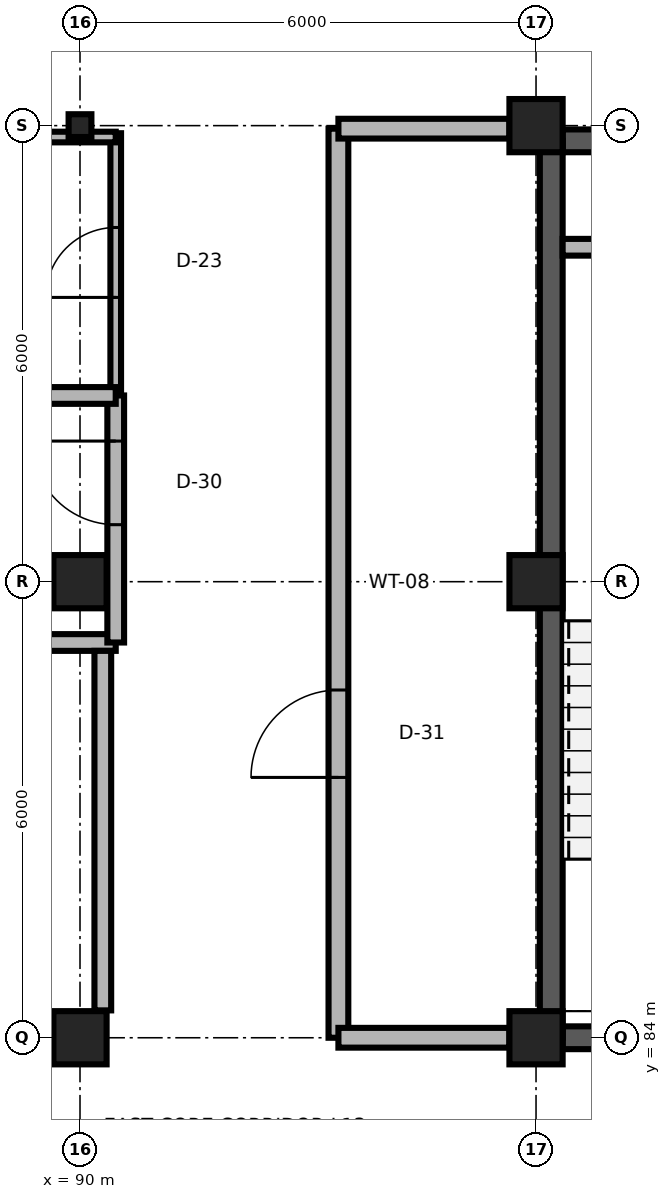
"""IFC4 building model, lengths in metres.
Left out: names, types, materials, properties, quantities, classifications, styles, units other than length and angle.
Written with IfcOpenShell. Run it as: python <this file> out.ifc"""

import sys

from ifc_helpers import new_model, si_unit, direction, frame, frame_2d, origin, origin_2d, place, context, subcontext, project, spatial, rectangle, i_section, extrude, element, fill, save


model = new_model("IFC4")
c1 = context("Model", 3, precision=1e-05, world=origin(), true_north=direction((0.0, 1.0)))
c2 = subcontext(c1, "Body", "Model", "MODEL_VIEW")
j1 = project(units=[si_unit("LENGTHUNIT", "METRE"), si_unit("PLANEANGLEUNIT", "RADIAN")], contexts=[c1])
p1 = place(None, origin())
s1 = spatial("IfcSite", under=j1, at=p1, CompositionType="ELEMENT")
p2 = place(p1, origin())
s2 = spatial("IfcBuilding", under=s1, at=p2, CompositionType="ELEMENT")
p3 = place(p2, frame((0.0, 0.0, 52.2)))
s3 = spatial("IfcBuildingStorey", under=s2, at=p3, CompositionType="ELEMENT", Elevation=52.2)
for number, where, z_axis, x_axis in (
    (1, (90.0, 84.0, 0.0), (0.0, 0.0, 1.0), (1.0, 0.0, 0.0)),
    (2, (96.0, 84.0, 0.0), (0.0, 0.0, 1.0), (1.0, 0.0, 0.0)),
    (3, (90.0, 90.0, 0.0), (0.0, 0.0, 1.0), (1.0, 0.0, 0.0)),
    (4, (96.0, 90.0, 0.0), (0.0, 0.0, 1.0), (1.0, 0.0, 0.0)),
):
    element("IfcColumn", number, at=place(p3, frame(where, z_axis=z_axis, x_axis=x_axis)), inside=s3, PredefinedType="COLUMN", context=c2, shape_type="SweptSolid", body=[
        extrude(rectangle(XDim=0.7, YDim=0.7, at=origin_2d()), origin(), (0.0, 0.0, 1.0), 3.9),
    ])
p4 = place(p3, frame((90.0, 96.0, 0.0), z_axis=(0.0, 0.0, 1.0), x_axis=(1.0, 0.0, 0.0)))
e5 = element("IfcColumn", 5, at=p4, inside=s3, PredefinedType="COLUMN", context=c2, shape_type="SweptSolid", body=[
    extrude(i_section(OverallWidth=0.3, OverallDepth=0.3, WebThickness=0.01, FlangeThickness=0.015, FilletRadius=0.018, at=origin_2d()), origin(), (0.0, 0.0, 1.0), 3.9),
])
p5 = place(p3, frame((96.0, 96.0, 0.0), z_axis=(0.0, 0.0, 1.0), x_axis=(1.0, 0.0, 0.0)))
e6 = element("IfcColumn", 6, at=p5, inside=s3, PredefinedType="COLUMN", context=c2, shape_type="SweptSolid", body=[
    extrude(rectangle(XDim=0.7, YDim=0.7, at=origin_2d()), origin(), (0.0, 0.0, 1.0), 3.9),
])
p6 = place(p3, frame((96.35, 84.0, 0.0), z_axis=(0.0, 0.0, 1.0), x_axis=(1.0, 0.0, 0.0)))
e7 = element("IfcWall", 7, at=p6, inside=s3, PredefinedType="SHEAR", context=c2, shape_type="SweptSolid", body=[
    extrude(rectangle(XDim=5.3, YDim=0.3, at=frame_2d((2.65, 0.0))), origin(), (0.0, 0.0, 1.0), 3.66),
])
p7 = place(p6, frame((1.975, 0.0, 0.0)))
e8 = element("IfcOpeningElement", 8, at=p7, cuts=e7, PredefinedType="OPENING", context=c2, shape_type="SweptSolid", body=[
    extrude(rectangle(XDim=1.35, YDim=2.2, at=frame_2d((0.675, 1.1))), frame((0.0, 0.165, 0.0), z_axis=(0.0, -1.0, 0.0), x_axis=(1.0, 0.0, 0.0)), (0.0, 0.0, 1.0), 0.33),
])
p8 = place(p3, frame((96.35, 95.8, 0.0), z_axis=(0.0, 0.0, 1.0), x_axis=(1.0, 0.0, 0.0)))
e9 = element("IfcWall", 9, at=p8, inside=s3, PredefinedType="SHEAR", context=c2, shape_type="SweptSolid", body=[
    extrude(rectangle(XDim=5.3, YDim=0.3, at=frame_2d((2.65, 0.0))), origin(), (0.0, 0.0, 1.0), 3.74),
])
p9 = place(p3, frame((96.2, 84.0, 0.0), z_axis=(0.0, 0.0, 1.0), x_axis=(0.0, 1.0, 0.0)))
e10 = element("IfcWall", 10, at=p9, inside=s3, PredefinedType="SHEAR", context=c2, shape_type="SweptSolid", body=[
    extrude(rectangle(XDim=11.8, YDim=0.3, at=frame_2d((5.9, 0.0))), origin(), (0.0, 0.0, 1.0), 3.74),
])
p10 = place(p3, frame((96.35, 94.4, 0.0), z_axis=(0.0, 0.0, 1.0), x_axis=(1.0, 0.0, 0.0)))
e11 = element("IfcWall", 11, at=p10, inside=s3, PredefinedType="PARTITIONING", context=c2, shape_type="SweptSolid", body=[
    extrude(rectangle(XDim=1.1, YDim=0.22, at=frame_2d((0.55, 0.0))), origin(), (0.0, 0.0, 1.0), 3.74),
])
p11 = place(p3, frame((93.4, 84.0, 0.0), z_axis=(0.0, 0.0, 1.0), x_axis=(0.0, 1.0, 0.0)))
e12 = element("IfcWall", 12, at=p11, inside=s3, PredefinedType="PARTITIONING", context=c2, shape_type="SweptSolid", body=[
    extrude(rectangle(XDim=11.96, YDim=0.26, at=frame_2d((5.98, 0.0))), origin(), (0.0, 0.0, 1.0), 3.74),
])
p12 = place(p11, frame((3.425, 0.0, 0.0)))
e13 = element("IfcOpeningElement", 13, at=p12, cuts=e12, PredefinedType="OPENING", context=c2, shape_type="SweptSolid", body=[
    extrude(rectangle(XDim=1.15, YDim=2.2, at=frame_2d((0.575, 1.1))), frame((0.0, 0.145, 0.0), z_axis=(0.0, -1.0, 0.0), x_axis=(1.0, 0.0, 0.0)), (0.0, 0.0, 1.0), 0.29),
])
for number, where, z_axis, x_axis in (
    (14, (93.4, 84.0, 0.0), (0.0, 0.0, 1.0), (1.0, 0.0, 0.0)),
    (15, (93.4, 95.96, 0.0), (0.0, 0.0, 1.0), (1.0, 0.0, 0.0)),
):
    element("IfcWall", number, at=place(p3, frame(where, z_axis=z_axis, x_axis=x_axis)), inside=s3, PredefinedType="PARTITIONING", context=c2, shape_type="SweptSolid", body=[
        extrude(rectangle(XDim=2.25, YDim=0.26, at=frame_2d((1.125, 0.0))), origin(), (0.0, 0.0, 1.0), 3.449),
    ])
p13 = place(p3, frame((87.8, 84.0, 0.0), z_axis=(0.0, 0.0, 1.0), x_axis=(1.0, 0.0, 0.0)))
e16 = element("IfcWall", 16, at=p13, inside=s3, PredefinedType="PARTITIONING", context=c2, shape_type="SweptSolid", body=[
    extrude(rectangle(XDim=2.5, YDim=0.22, at=frame_2d((1.25, 0.0))), origin(), (0.0, 0.0, 1.0), 3.449),
])
p14 = place(p13, frame((0.75, 0.0, 0.0)))
e17 = element("IfcOpeningElement", 17, at=p14, cuts=e16, PredefinedType="OPENING", context=c2, shape_type="SweptSolid", body=[
    extrude(rectangle(XDim=1.0, YDim=2.15, at=frame_2d((0.5, 1.075))), frame((0.0, 0.125, 0.0), z_axis=(0.0, -1.0, 0.0), x_axis=(1.0, 0.0, 0.0)), (0.0, 0.0, 1.0), 0.25),
])
p15 = place(p3, frame((80.6, 89.2, 0.0), z_axis=(0.0, 0.0, 1.0), x_axis=(1.0, 0.0, 0.0)))
e18 = element("IfcWall", 18, at=p15, inside=s3, PredefinedType="PARTITIONING", context=c2, shape_type="SweptSolid", body=[
    extrude(rectangle(XDim=9.87, YDim=0.22, at=frame_2d((4.935, 0.0))), origin(), (0.0, 0.0, 1.0), 3.74),
])
p16 = place(p3, frame((90.47, 89.2, 0.0), z_axis=(0.0, 0.0, 1.0), x_axis=(0.0, 1.0, 0.0)))
e19 = element("IfcWall", 19, at=p16, inside=s3, PredefinedType="PARTITIONING", context=c2, shape_type="SweptSolid", body=[
    extrude(rectangle(XDim=3.25, YDim=0.22, at=frame_2d((1.625, 0.0))), origin(), (0.0, 0.0, 1.0), 3.74),
])
p17 = place(p16, frame((1.55, 0.0, 0.0)))
e20 = element("IfcOpeningElement", 20, at=p17, cuts=e19, PredefinedType="OPENING", context=c2, shape_type="SweptSolid", body=[
    extrude(rectangle(XDim=1.1, YDim=2.15, at=frame_2d((0.55, 1.075))), frame((0.0, 0.125, 0.0), z_axis=(0.0, -1.0, 0.0), x_axis=(1.0, 0.0, 0.0)), (0.0, 0.0, 1.0), 0.25),
])
p18 = place(p3, frame((90.47, 92.5, 0.0), z_axis=(0.0, 0.0, 1.0), x_axis=(0.0, 1.0, 0.0)))
e21 = element("IfcWall", 21, at=p18, inside=s3, PredefinedType="PARTITIONING", context=c2, shape_type="SweptSolid", body=[
    extrude(rectangle(XDim=3.4, YDim=0.14, at=frame_2d((1.7, 0.0))), origin(), (0.0, 0.0, 1.0), 3.74),
])
p19 = place(p18, frame((1.24, 0.0, 0.0)))
e22 = element("IfcOpeningElement", 22, at=p19, cuts=e21, PredefinedType="OPENING", context=c2, shape_type="SweptSolid", body=[
    extrude(rectangle(XDim=0.92, YDim=2.15, at=frame_2d((0.46, 1.075))), frame((0.0, 0.085, 0.0), z_axis=(0.0, -1.0, 0.0), x_axis=(1.0, 0.0, 0.0)), (0.0, 0.0, 1.0), 0.17),
])
p20 = place(p3, frame((83.6, 95.85, 0.0), z_axis=(0.0, 0.0, 1.0), x_axis=(1.0, 0.0, 0.0)))
e23 = element("IfcWall", 23, at=p20, inside=s3, PredefinedType="PARTITIONING", context=c2, shape_type="SweptSolid", body=[
    extrude(rectangle(XDim=6.87, YDim=0.14, at=frame_2d((3.435, 0.0))), origin(), (0.0, 0.0, 1.0), 3.74),
])
p21 = place(p3, frame((90.3, 84.36, 0.0), z_axis=(0.0, 0.0, 1.0), x_axis=(0.0, 1.0, 0.0)))
e24 = element("IfcWall", 24, at=p21, inside=s3, PredefinedType="PARTITIONING", context=c2, shape_type="SweptSolid", body=[
    extrude(rectangle(XDim=4.73, YDim=0.22, at=frame_2d((2.365, 0.0))), origin(), (0.0, 0.0, 1.0), 3.74),
])
p22 = place(p3, frame((83.5, 92.45, 0.0), z_axis=(0.0, 0.0, 1.0), x_axis=(1.0, 0.0, 0.0)))
e25 = element("IfcWall", 25, at=p22, inside=s3, PredefinedType="PARTITIONING", context=c2, shape_type="SweptSolid", body=[
    extrude(rectangle(XDim=6.97, YDim=0.22, at=frame_2d((3.485, 0.0))), origin(), (0.0, 0.0, 1.0), 3.74),
])
p23 = place(p12, origin())
e26 = element("IfcDoor", 26, at=p23, inside=s3, OperationType="SINGLE_SWING_LEFT", PredefinedType="DOOR", context=c2, shape_type="SweptSolid", body=[
    extrude(rectangle(XDim=1.15, YDim=2.2, at=frame_2d((0.575, 1.1))), frame((0.0, 0.025, 0.0), z_axis=(0.0, -1.0, 0.0), x_axis=(1.0, 0.0, 0.0)), (0.0, 0.0, 1.0), 0.05),
])
fill(e13, e26)
p24 = place(p17, origin())
e27 = element("IfcDoor", 27, at=p24, inside=s3, OperationType="SINGLE_SWING_RIGHT", PredefinedType="DOOR", context=c2, shape_type="SweptSolid", body=[
    extrude(rectangle(XDim=1.1, YDim=2.15, at=frame_2d((0.55, 1.075))), frame((0.0, 0.025, 0.0), z_axis=(0.0, -1.0, 0.0), x_axis=(1.0, 0.0, 0.0)), (0.0, 0.0, 1.0), 0.05),
])
fill(e20, e27)
p25 = place(p19, origin())
e28 = element("IfcDoor", 28, at=p25, inside=s3, OperationType="SINGLE_SWING_LEFT", PredefinedType="DOOR", context=c2, shape_type="SweptSolid", body=[
    extrude(rectangle(XDim=0.92, YDim=2.15, at=frame_2d((0.46, 1.075))), frame((0.0, 0.025, 0.0), z_axis=(0.0, -1.0, 0.0), x_axis=(1.0, 0.0, 0.0)), (0.0, 0.0, 1.0), 0.05),
])
fill(e22, e28)
save(model, sys.argv[1])
